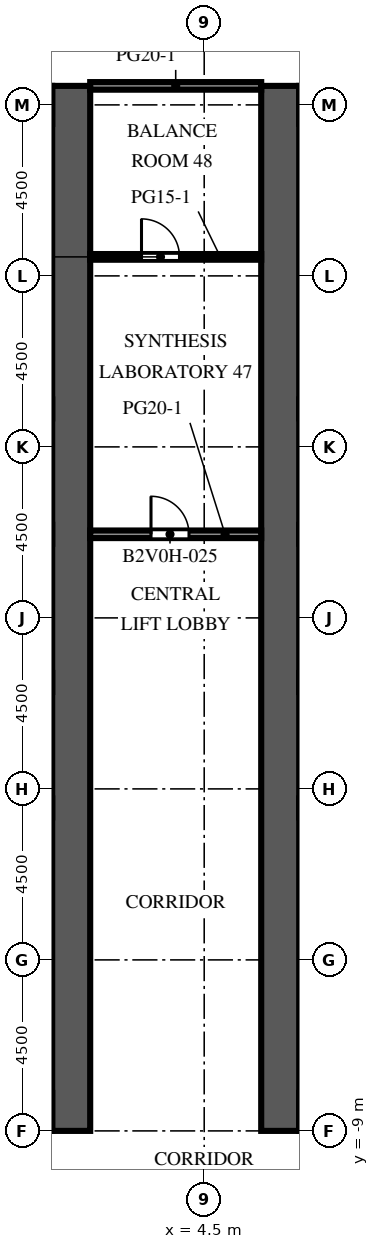
"""IFC4 building model, lengths in metres.
Left out: names, types, materials, properties, quantities, classifications, styles, units other than length and angle.
Written with IfcOpenShell. Run it as: python <this file> out.ifc"""

import sys

from ifc_helpers import new_model, si_unit, direction, frame, frame_2d, origin, place, context, subcontext, project, spatial, rectangle, extrude, element, fill, save


model = new_model("IFC4")
c1 = context("Model", 3, precision=1e-05, world=origin(), true_north=direction((0.0, 1.0)))
c2 = subcontext(c1, "Body", "Model", "MODEL_VIEW")
j1 = project(units=[si_unit("LENGTHUNIT", "METRE"), si_unit("PLANEANGLEUNIT", "RADIAN")], contexts=[c1])
p1 = place(None, origin())
s1 = spatial("IfcSite", under=j1, at=p1, CompositionType="ELEMENT")
p2 = place(p1, origin())
s2 = spatial("IfcBuilding", under=s1, at=p2, CompositionType="ELEMENT")
p3 = place(p2, frame((0.0, 0.0, 41.9)))
s3 = spatial("IfcBuildingStorey", under=s2, at=p3, CompositionType="ELEMENT", Elevation=41.9)
p4 = place(p3, frame((1.0, -9.0, 0.0), z_axis=(0.0, 0.0, 1.0), x_axis=(0.0, 1.0, 0.0)))
e1 = element("IfcWall", 1, at=p4, inside=s3, PredefinedType="SHEAR", context=c2, shape_type="SweptSolid", body=[
    extrude(rectangle(XDim=27.5, YDim=1.0, at=frame_2d((13.75, 0.0))), origin(), (0.0, 0.0, 1.0), 4.1),
])
p5 = place(p4, frame((12.55, 0.0, 0.0)))
e2 = element("IfcOpeningElement", 2, at=p5, cuts=e1, PredefinedType="OPENING", context=c2, shape_type="SweptSolid", body=[
    extrude(rectangle(XDim=2.4, YDim=2.4, at=frame_2d((1.2, 1.2))), frame((0.0, 0.51, 0.0), z_axis=(0.0, -1.0, 0.0), x_axis=(1.0, 0.0, 0.0)), (0.0, 0.0, 1.0), 1.02),
])
p6 = place(p4, frame((4.025, 0.0, 0.0)))
e3 = element("IfcOpeningElement", 3, at=p6, cuts=e1, PredefinedType="OPENING", context=c2, shape_type="SweptSolid", body=[
    extrude(rectangle(XDim=1.2, YDim=2.1, at=frame_2d((0.6, 1.05))), frame((0.0, 0.51, 0.0), z_axis=(0.0, -1.0, 0.0), x_axis=(1.0, 0.0, 0.0)), (0.0, 0.0, 1.0), 1.02),
])
p7 = place(p4, frame((19.475, 0.0, 0.0)))
e4 = element("IfcOpeningElement", 4, at=p7, cuts=e1, PredefinedType="OPENING", context=c2, shape_type="SweptSolid", body=[
    extrude(rectangle(XDim=1.0, YDim=2.1, at=frame_2d((0.5, 1.05))), frame((0.0, 0.51, 0.0), z_axis=(0.0, -1.0, 0.0), x_axis=(1.0, 0.0, 0.0)), (0.0, 0.0, 1.0), 1.02),
])
p8 = place(p4, frame((21.106, 0.0, 0.0)))
e5 = element("IfcOpeningElement", 5, at=p8, cuts=e1, PredefinedType="OPENING", context=c2, shape_type="SweptSolid", body=[
    extrude(rectangle(XDim=1.0, YDim=2.1, at=frame_2d((0.5, 1.05))), frame((0.0, 0.51, 0.0), z_axis=(0.0, -1.0, 0.0), x_axis=(1.0, 0.0, 0.0)), (0.0, 0.0, 1.0), 1.02),
])
p9 = place(p4, frame((23.1, 0.0, 0.0)))
e6 = element("IfcOpeningElement", 6, at=p9, cuts=e1, PredefinedType="OPENING", context=c2, shape_type="SweptSolid", body=[
    extrude(rectangle(XDim=1.0, YDim=2.1, at=frame_2d((0.5, 1.05))), frame((0.0, 0.51, 0.0), z_axis=(0.0, -1.0, 0.0), x_axis=(1.0, 0.0, 0.0)), (0.0, 0.0, 1.0), 1.02),
])
p10 = place(p4, frame((25.094, 0.0, 0.0)))
e7 = element("IfcOpeningElement", 7, at=p10, cuts=e1, PredefinedType="OPENING", context=c2, shape_type="SweptSolid", body=[
    extrude(rectangle(XDim=1.0, YDim=2.1, at=frame_2d((0.5, 1.05))), frame((0.0, 0.51, 0.0), z_axis=(0.0, -1.0, 0.0), x_axis=(1.0, 0.0, 0.0)), (0.0, 0.0, 1.0), 1.02),
])
p11 = place(p3, frame((6.5, -9.0, 0.0), z_axis=(0.0, 0.0, 1.0), x_axis=(0.0, 1.0, 0.0)))
e8 = element("IfcWall", 8, at=p11, inside=s3, PredefinedType="SHEAR", context=c2, shape_type="SweptSolid", body=[
    extrude(rectangle(XDim=27.5, YDim=1.0, at=frame_2d((13.75, 0.0))), origin(), (0.0, 0.0, 1.0), 4.1),
])
p12 = place(p11, frame((12.55, 0.0, 0.0)))
e9 = element("IfcOpeningElement", 9, at=p12, cuts=e8, PredefinedType="OPENING", context=c2, shape_type="SweptSolid", body=[
    extrude(rectangle(XDim=2.4, YDim=2.4, at=frame_2d((1.2, 1.2))), frame((0.0, 0.51, 0.0), z_axis=(0.0, -1.0, 0.0), x_axis=(1.0, 0.0, 0.0)), (0.0, 0.0, 1.0), 1.02),
])
p13 = place(p11, frame((4.025, 0.0, 0.0)))
e10 = element("IfcOpeningElement", 10, at=p13, cuts=e8, PredefinedType="OPENING", context=c2, shape_type="SweptSolid", body=[
    extrude(rectangle(XDim=1.2, YDim=2.1, at=frame_2d((0.6, 1.05))), frame((0.0, 0.51, 0.0), z_axis=(0.0, -1.0, 0.0), x_axis=(1.0, 0.0, 0.0)), (0.0, 0.0, 1.0), 1.02),
])
p14 = place(p11, frame((19.475, 0.0, 0.0)))
e11 = element("IfcOpeningElement", 11, at=p14, cuts=e8, PredefinedType="OPENING", context=c2, shape_type="SweptSolid", body=[
    extrude(rectangle(XDim=1.0, YDim=2.1, at=frame_2d((0.5, 1.05))), frame((0.0, 0.51, 0.0), z_axis=(0.0, -1.0, 0.0), x_axis=(1.0, 0.0, 0.0)), (0.0, 0.0, 1.0), 1.02),
])
p15 = place(p11, frame((21.106, 0.0, 0.0)))
e12 = element("IfcOpeningElement", 12, at=p15, cuts=e8, PredefinedType="OPENING", context=c2, shape_type="SweptSolid", body=[
    extrude(rectangle(XDim=1.0, YDim=2.1, at=frame_2d((0.5, 1.05))), frame((0.0, 0.51, 0.0), z_axis=(0.0, -1.0, 0.0), x_axis=(1.0, 0.0, 0.0)), (0.0, 0.0, 1.0), 1.02),
])
p16 = place(p11, frame((23.1, 0.0, 0.0)))
e13 = element("IfcOpeningElement", 13, at=p16, cuts=e8, PredefinedType="OPENING", context=c2, shape_type="SweptSolid", body=[
    extrude(rectangle(XDim=1.0, YDim=2.1, at=frame_2d((0.5, 1.05))), frame((0.0, 0.51, 0.0), z_axis=(0.0, -1.0, 0.0), x_axis=(1.0, 0.0, 0.0)), (0.0, 0.0, 1.0), 1.02),
])
p17 = place(p11, frame((25.094, 0.0, 0.0)))
e14 = element("IfcOpeningElement", 14, at=p17, cuts=e8, PredefinedType="OPENING", context=c2, shape_type="SweptSolid", body=[
    extrude(rectangle(XDim=1.0, YDim=2.1, at=frame_2d((0.5, 1.05))), frame((0.0, 0.51, 0.0), z_axis=(0.0, -1.0, 0.0), x_axis=(1.0, 0.0, 0.0)), (0.0, 0.0, 1.0), 1.02),
])
p18 = place(p3, frame((1.5, 6.7, 0.0), z_axis=(0.0, 0.0, 1.0), x_axis=(1.0, 0.0, 0.0)))
e15 = element("IfcWall", 15, at=p18, inside=s3, PredefinedType="PARTITIONING", context=c2, shape_type="SweptSolid", body=[
    extrude(rectangle(XDim=4.5, YDim=0.2, at=frame_2d((2.25, 0.0))), origin(), (0.0, 0.0, 1.0), 3.65),
])
p19 = place(p18, frame((1.6, 0.0, 0.0)))
e16 = element("IfcOpeningElement", 16, at=p19, cuts=e15, PredefinedType="OPENING", context=c2, shape_type="SweptSolid", body=[
    extrude(rectangle(XDim=1.0, YDim=2.1, at=frame_2d((0.5, 1.05))), frame((0.0, 0.11, 0.0), z_axis=(0.0, -1.0, 0.0), x_axis=(1.0, 0.0, 0.0)), (0.0, 0.0, 1.0), 0.22),
])
p20 = place(p3, frame((1.5, 14.0, 0.0), z_axis=(0.0, 0.0, 1.0), x_axis=(1.0, 0.0, 0.0)))
e17 = element("IfcWall", 17, at=p20, inside=s3, PredefinedType="PARTITIONING", context=c2, shape_type="SweptSolid", body=[
    extrude(rectangle(XDim=4.5, YDim=0.15, at=frame_2d((2.25, 0.0))), origin(), (0.0, 0.0, 1.0), 3.65),
])
p21 = place(p20, frame((1.35, 0.0, 0.0)))
e18 = element("IfcOpeningElement", 18, at=p21, cuts=e17, PredefinedType="OPENING", context=c2, shape_type="SweptSolid", body=[
    extrude(rectangle(XDim=1.0, YDim=2.1, at=frame_2d((0.5, 1.05))), frame((0.0, 0.085, 0.0), z_axis=(0.0, -1.0, 0.0), x_axis=(1.0, 0.0, 0.0)), (0.0, 0.0, 1.0), 0.17),
])
p22 = place(p3, frame((1.5, 18.5, 0.0), z_axis=(0.0, 0.0, 1.0), x_axis=(1.0, 0.0, 0.0)))
e19 = element("IfcWall", 19, at=p22, inside=s3, PredefinedType="PARTITIONING", context=c2, shape_type="SweptSolid", body=[
    extrude(rectangle(XDim=4.5, YDim=0.2, at=frame_2d((2.25, 0.0))), origin(), (0.0, 0.0, 1.0), 3.65),
])
p23 = place(p5, origin())
e20 = element("IfcDoor", 20, at=p23, inside=s3, OperationType="DOUBLE_DOOR_DOUBLE_SWING", PredefinedType="DOOR", context=c2, shape_type="SweptSolid", body=[
    extrude(rectangle(XDim=2.4, YDim=2.4, at=frame_2d((1.2, 1.2))), frame((0.0, 0.025, 0.0), z_axis=(0.0, -1.0, 0.0), x_axis=(1.0, 0.0, 0.0)), (0.0, 0.0, 1.0), 0.05),
])
fill(e2, e20)
p24 = place(p12, origin())
e21 = element("IfcDoor", 21, at=p24, inside=s3, OperationType="DOUBLE_DOOR_DOUBLE_SWING", PredefinedType="DOOR", context=c2, shape_type="SweptSolid", body=[
    extrude(rectangle(XDim=2.4, YDim=2.4, at=frame_2d((1.2, 1.2))), frame((0.0, 0.025, 0.0), z_axis=(0.0, -1.0, 0.0), x_axis=(1.0, 0.0, 0.0)), (0.0, 0.0, 1.0), 0.05),
])
fill(e9, e21)
p25 = place(p6, origin())
e22 = element("IfcDoor", 22, at=p25, inside=s3, OperationType="SINGLE_SWING_LEFT", PredefinedType="DOOR", context=c2, shape_type="SweptSolid", body=[
    extrude(rectangle(XDim=1.2, YDim=2.1, at=frame_2d((0.6, 1.05))), frame((0.0, 0.475, 0.0), z_axis=(0.0, -1.0, 0.0), x_axis=(1.0, 0.0, 0.0)), (0.0, 0.0, 1.0), 0.05),
])
fill(e3, e22)
p26 = place(p7, origin())
e23 = element("IfcDoor", 23, at=p26, inside=s3, OperationType="SINGLE_SWING_LEFT", PredefinedType="DOOR", context=c2, shape_type="SweptSolid", body=[
    extrude(rectangle(XDim=1.0, YDim=2.1, at=frame_2d((0.5, 1.05))), frame((0.0, 0.475, 0.0), z_axis=(0.0, -1.0, 0.0), x_axis=(1.0, 0.0, 0.0)), (0.0, 0.0, 1.0), 0.05),
])
fill(e4, e23)
p27 = place(p8, origin())
e24 = element("IfcDoor", 24, at=p27, inside=s3, OperationType="SINGLE_SWING_RIGHT", PredefinedType="DOOR", context=c2, shape_type="SweptSolid", body=[
    extrude(rectangle(XDim=1.0, YDim=2.1, at=frame_2d((0.5, 1.05))), frame((0.0, 0.475, 0.0), z_axis=(0.0, -1.0, 0.0), x_axis=(1.0, 0.0, 0.0)), (0.0, 0.0, 1.0), 0.05),
])
fill(e5, e24)
p28 = place(p9, origin())
e25 = element("IfcDoor", 25, at=p28, inside=s3, OperationType="SINGLE_SWING_LEFT", PredefinedType="DOOR", context=c2, shape_type="SweptSolid", body=[
    extrude(rectangle(XDim=1.0, YDim=2.1, at=frame_2d((0.5, 1.05))), frame((0.0, 0.475, 0.0), z_axis=(0.0, -1.0, 0.0), x_axis=(1.0, 0.0, 0.0)), (0.0, 0.0, 1.0), 0.05),
])
fill(e6, e25)
p29 = place(p10, origin())
e26 = element("IfcDoor", 26, at=p29, inside=s3, OperationType="SINGLE_SWING_RIGHT", PredefinedType="DOOR", context=c2, shape_type="SweptSolid", body=[
    extrude(rectangle(XDim=1.0, YDim=2.1, at=frame_2d((0.5, 1.05))), frame((0.0, 0.475, 0.0), z_axis=(0.0, -1.0, 0.0), x_axis=(1.0, 0.0, 0.0)), (0.0, 0.0, 1.0), 0.05),
])
fill(e7, e26)
p30 = place(p13, origin())
e27 = element("IfcDoor", 27, at=p30, inside=s3, OperationType="SINGLE_SWING_RIGHT", PredefinedType="DOOR", context=c2, shape_type="SweptSolid", body=[
    extrude(rectangle(XDim=1.2, YDim=2.1, at=frame_2d((0.6, 1.05))), frame((0.0, -0.425, 0.0), z_axis=(0.0, -1.0, 0.0), x_axis=(1.0, 0.0, 0.0)), (0.0, 0.0, 1.0), 0.05),
])
fill(e10, e27)
p31 = place(p14, origin())
e28 = element("IfcDoor", 28, at=p31, inside=s3, OperationType="SINGLE_SWING_RIGHT", PredefinedType="DOOR", context=c2, shape_type="SweptSolid", body=[
    extrude(rectangle(XDim=1.0, YDim=2.1, at=frame_2d((0.5, 1.05))), frame((0.0, -0.425, 0.0), z_axis=(0.0, -1.0, 0.0), x_axis=(1.0, 0.0, 0.0)), (0.0, 0.0, 1.0), 0.05),
])
fill(e11, e28)
p32 = place(p15, origin())
e29 = element("IfcDoor", 29, at=p32, inside=s3, OperationType="SINGLE_SWING_LEFT", PredefinedType="DOOR", context=c2, shape_type="SweptSolid", body=[
    extrude(rectangle(XDim=1.0, YDim=2.1, at=frame_2d((0.5, 1.05))), frame((0.0, -0.425, 0.0), z_axis=(0.0, -1.0, 0.0), x_axis=(1.0, 0.0, 0.0)), (0.0, 0.0, 1.0), 0.05),
])
fill(e12, e29)
p33 = place(p16, origin())
e30 = element("IfcDoor", 30, at=p33, inside=s3, OperationType="SINGLE_SWING_RIGHT", PredefinedType="DOOR", context=c2, shape_type="SweptSolid", body=[
    extrude(rectangle(XDim=1.0, YDim=2.1, at=frame_2d((0.5, 1.05))), frame((0.0, -0.425, 0.0), z_axis=(0.0, -1.0, 0.0), x_axis=(1.0, 0.0, 0.0)), (0.0, 0.0, 1.0), 0.05),
])
fill(e13, e30)
p34 = place(p17, origin())
e31 = element("IfcDoor", 31, at=p34, inside=s3, OperationType="SINGLE_SWING_LEFT", PredefinedType="DOOR", context=c2, shape_type="SweptSolid", body=[
    extrude(rectangle(XDim=1.0, YDim=2.1, at=frame_2d((0.5, 1.05))), frame((0.0, -0.425, 0.0), z_axis=(0.0, -1.0, 0.0), x_axis=(1.0, 0.0, 0.0)), (0.0, 0.0, 1.0), 0.05),
])
fill(e14, e31)
p35 = place(p19, origin())
e32 = element("IfcDoor", 32, at=p35, inside=s3, OperationType="SINGLE_SWING_LEFT", PredefinedType="DOOR", context=c2, shape_type="SweptSolid", body=[
    extrude(rectangle(XDim=1.0, YDim=2.1, at=frame_2d((0.5, 1.05))), frame((0.0, 0.025, 0.0), z_axis=(0.0, -1.0, 0.0), x_axis=(1.0, 0.0, 0.0)), (0.0, 0.0, 1.0), 0.05),
])
fill(e16, e32)
p36 = place(p21, origin())
e33 = element("IfcDoor", 33, at=p36, inside=s3, OperationType="SINGLE_SWING_LEFT", PredefinedType="DOOR", context=c2, shape_type="SweptSolid", body=[
    extrude(rectangle(XDim=1.0, YDim=2.1, at=frame_2d((0.5, 1.05))), frame((0.0, 0.025, 0.0), z_axis=(0.0, -1.0, 0.0), x_axis=(1.0, 0.0, 0.0)), (0.0, 0.0, 1.0), 0.05),
])
fill(e18, e33)
save(model, sys.argv[1])
